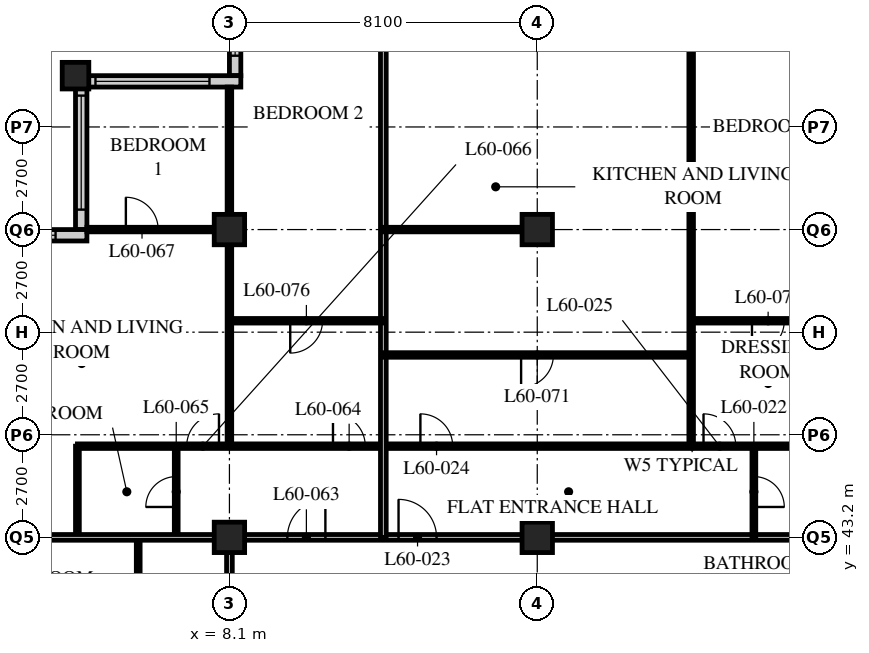
"""IFC4 building model, lengths in metres.
Left out: names, types, materials, properties, quantities, classifications, styles, units other than length and angle.
Written with IfcOpenShell. Run it as: python <this file> out.ifc"""

import sys

from ifc_helpers import new_model, si_unit, direction, frame, frame_2d, origin, origin_2d, place, context, subcontext, project, spatial, rectangle, hollow_rectangle, extrude, element, fill, save


model = new_model("IFC4")
c1 = context("Model", 3, precision=1e-05, world=origin(), true_north=direction((0.0, 1.0)))
c2 = subcontext(c1, "Body", "Model", "MODEL_VIEW")
j1 = project(units=[si_unit("LENGTHUNIT", "METRE"), si_unit("PLANEANGLEUNIT", "RADIAN")], contexts=[c1])
p1 = place(None, origin())
s1 = spatial("IfcSite", under=j1, at=p1, CompositionType="ELEMENT")
p2 = place(p1, origin())
s2 = spatial("IfcBuilding", under=s1, at=p2, CompositionType="ELEMENT")
p3 = place(p2, frame((0.0, 0.0, 231.6)))
s3 = spatial("IfcBuildingStorey", under=s2, at=p3, CompositionType="ELEMENT", Elevation=231.6)
p4 = place(p3, frame((4.05, 55.35, 0.0), z_axis=(0.0, 0.0, 1.0), x_axis=(1.0, 0.0, 0.0)))
e1 = element("IfcColumn", 1, at=p4, inside=s3, PredefinedType="COLUMN", context=c2, shape_type="SweptSolid", body=[
    extrude(hollow_rectangle(XDim=0.7, YDim=0.7, WallThickness=0.07, at=origin_2d()), origin(), (0.0, 0.0, 1.0), 3.6),
])
for number, where, z_axis, x_axis in (
    (2, (8.1, 43.2, 0.0), (0.0, 0.0, 1.0), (1.0, 0.0, 0.0)),
    (3, (8.1, 51.3, 0.0), (0.0, 0.0, 1.0), (1.0, 0.0, 0.0)),
    (4, (16.2, 43.2, 0.0), (0.0, 0.0, 1.0), (1.0, 0.0, 0.0)),
    (5, (16.2, 51.3, 0.0), (0.0, 0.0, 1.0), (1.0, 0.0, 0.0)),
):
    element("IfcColumn", number, at=place(p3, frame(where, z_axis=z_axis, x_axis=x_axis)), inside=s3, PredefinedType="COLUMN", context=c2, shape_type="SweptSolid", body=[
        extrude(hollow_rectangle(XDim=0.8, YDim=0.8, WallThickness=0.08, at=origin_2d()), origin(), (0.0, 0.0, 1.0), 3.6),
    ])
p5 = place(p3, frame((8.25, 59.1, 0.0), z_axis=(0.0, 0.0, 1.0), x_axis=(0.0, -1.0, 0.0)))
e6 = element("IfcWall", 6, at=p5, inside=s3, PredefinedType="SOLIDWALL", context=c2, shape_type="SweptSolid", body=[
    extrude(rectangle(XDim=3.75, YDim=0.3, at=frame_2d((1.875, 0.0))), origin(), (0.0, 0.0, 1.0), 2.35),
])
p6 = place(p5, frame((0.225, 0.0, 0.6)))
e7 = element("IfcOpeningElement", 7, at=p6, cuts=e6, PredefinedType="OPENING", context=c2, shape_type="SweptSolid", body=[
    extrude(rectangle(XDim=3.0, YDim=1.7, at=frame_2d((1.5, 0.85))), frame((0.0, 0.16, 0.0), z_axis=(0.0, -1.0, 0.0), x_axis=(1.0, 0.0, 0.0)), (0.0, 0.0, 1.0), 0.32),
])
p7 = place(p3, frame((8.4, 55.2, 0.0), z_axis=(0.0, 0.0, 1.0), x_axis=(-1.0, 0.0, 0.0)))
e8 = element("IfcWall", 8, at=p7, inside=s3, PredefinedType="SOLIDWALL", context=c2, shape_type="SweptSolid", body=[
    extrude(rectangle(XDim=4.35, YDim=0.3, at=frame_2d((2.175, 0.0))), origin(), (0.0, 0.0, 1.0), 2.65),
])
p8 = place(p7, frame((0.825, 0.0, 0.6)))
e9 = element("IfcOpeningElement", 9, at=p8, cuts=e8, PredefinedType="OPENING", context=c2, shape_type="SweptSolid", body=[
    extrude(rectangle(XDim=3.0, YDim=1.7, at=frame_2d((1.5, 0.85))), frame((0.0, 0.16, 0.0), z_axis=(0.0, -1.0, 0.0), x_axis=(1.0, 0.0, 0.0)), (0.0, 0.0, 1.0), 0.32),
])
p9 = place(p3, frame((4.2, 55.05, 0.0), z_axis=(0.0, 0.0, 1.0), x_axis=(0.0, -1.0, 0.0)))
e10 = element("IfcWall", 10, at=p9, inside=s3, PredefinedType="SOLIDWALL", context=c2, shape_type="SweptSolid", body=[
    extrude(rectangle(XDim=3.75, YDim=0.3, at=frame_2d((1.875, 0.0))), origin(), (0.0, 0.0, 1.0), 2.65),
])
p10 = place(p9, frame((0.225, 0.0, 0.6)))
e11 = element("IfcOpeningElement", 11, at=p10, cuts=e10, PredefinedType="OPENING", context=c2, shape_type="SweptSolid", body=[
    extrude(rectangle(XDim=3.0, YDim=1.7, at=frame_2d((1.5, 0.85))), frame((0.0, 0.16, 0.0), z_axis=(0.0, -1.0, 0.0), x_axis=(1.0, 0.0, 0.0)), (0.0, 0.0, 1.0), 0.32),
])
p11 = place(p3, frame((4.35, 51.15, 0.0), z_axis=(0.0, 0.0, 1.0), x_axis=(-1.0, 0.0, 0.0)))
e12 = element("IfcWall", 12, at=p11, inside=s3, PredefinedType="SOLIDWALL", context=c2, shape_type="SweptSolid", body=[
    extrude(rectangle(XDim=4.35, YDim=0.3, at=frame_2d((2.175, 0.0))), origin(), (0.0, 0.0, 1.0), 3.35),
])
p12 = place(p11, frame((0.825, 0.0, 0.6)))
e13 = element("IfcOpeningElement", 13, at=p12, cuts=e12, PredefinedType="OPENING", context=c2, shape_type="SweptSolid", body=[
    extrude(rectangle(XDim=3.0, YDim=1.7, at=frame_2d((1.5, 0.85))), frame((0.0, 0.16, 0.0), z_axis=(0.0, -1.0, 0.0), x_axis=(1.0, 0.0, 0.0)), (0.0, 0.0, 1.0), 0.32),
])
p13 = place(p3, frame((8.1, 43.2, 0.0), z_axis=(0.0, 0.0, 1.0), x_axis=(1.0, 0.0, 0.0)))
e14 = element("IfcWall", 14, at=p13, inside=s3, PredefinedType="PARTITIONING", context=c2, shape_type="SweptSolid", body=[
    extrude(rectangle(XDim=36.45, YDim=0.15, at=frame_2d((18.225, 0.0))), origin(), (0.0, 0.0, 1.0), 2.35),
])
p14 = place(p13, frame((4.45, 0.0, 0.0)))
e15 = element("IfcOpeningElement", 15, at=p14, cuts=e14, PredefinedType="OPENING", context=c2, shape_type="SweptSolid", body=[
    extrude(rectangle(XDim=1.0, YDim=2.1, at=frame_2d((0.5, 1.05))), frame((0.0, 0.085, 0.0), z_axis=(0.0, -1.0, 0.0), x_axis=(1.0, 0.0, 0.0)), (0.0, 0.0, 1.0), 0.17),
])
p15 = place(p13, frame((17.1, 0.0, 0.0)))
e16 = element("IfcOpeningElement", 16, at=p15, cuts=e14, PredefinedType="OPENING", context=c2, shape_type="SweptSolid", body=[
    extrude(rectangle(XDim=1.0, YDim=2.1, at=frame_2d((0.5, 1.05))), frame((0.0, 0.085, 0.0), z_axis=(0.0, -1.0, 0.0), x_axis=(1.0, 0.0, 0.0)), (0.0, 0.0, 1.0), 0.17),
])
p16 = place(p13, frame((29.05, 0.0, 0.0)))
e17 = element("IfcOpeningElement", 17, at=p16, cuts=e14, PredefinedType="OPENING", context=c2, shape_type="SweptSolid", body=[
    extrude(rectangle(XDim=1.0, YDim=2.1, at=frame_2d((0.5, 1.05))), frame((0.0, 0.085, 0.0), z_axis=(0.0, -1.0, 0.0), x_axis=(1.0, 0.0, 0.0)), (0.0, 0.0, 1.0), 0.17),
])
p17 = place(p13, frame((33.925, 0.0, 0.0)))
e18 = element("IfcOpeningElement", 18, at=p17, cuts=e14, PredefinedType="OPENING", context=c2, shape_type="SweptSolid", body=[
    extrude(rectangle(XDim=1.0, YDim=2.1, at=frame_2d((0.5, 1.05))), frame((0.0, 0.085, 0.0), z_axis=(0.0, -1.0, 0.0), x_axis=(1.0, 0.0, 0.0)), (0.0, 0.0, 1.0), 0.17),
])
p18 = place(p13, frame((1.525, 0.0, 0.0)))
e19 = element("IfcOpeningElement", 19, at=p18, cuts=e14, PredefinedType="OPENING", context=c2, shape_type="SweptSolid", body=[
    extrude(rectangle(XDim=1.0, YDim=2.1, at=frame_2d((0.5, 1.05))), frame((0.0, 0.085, 0.0), z_axis=(0.0, -1.0, 0.0), x_axis=(1.0, 0.0, 0.0)), (0.0, 0.0, 1.0), 0.17),
])
p19 = place(p3, frame((8.1, 18.9, 0.0), z_axis=(0.0, 0.0, 1.0), x_axis=(0.0, 1.0, 0.0)))
e20 = element("IfcWall", 20, at=p19, inside=s3, PredefinedType="PARTITIONING", context=c2, shape_type="SweptSolid", body=[
    extrude(rectangle(XDim=24.3, YDim=0.15, at=frame_2d((12.15, 0.0))), origin(), (0.0, 0.0, 1.0), 2.35),
])
p20 = place(p19, frame((0.9, 0.0, 0.0)))
e21 = element("IfcOpeningElement", 21, at=p20, cuts=e20, PredefinedType="OPENING", context=c2, shape_type="SweptSolid", body=[
    extrude(rectangle(XDim=1.0, YDim=2.1, at=frame_2d((0.5, 1.05))), frame((0.0, 0.085, 0.0), z_axis=(0.0, -1.0, 0.0), x_axis=(1.0, 0.0, 0.0)), (0.0, 0.0, 1.0), 0.17),
])
p21 = place(p19, frame((20.95, 0.0, 0.0)))
e22 = element("IfcOpeningElement", 22, at=p21, cuts=e20, PredefinedType="OPENING", context=c2, shape_type="SweptSolid", body=[
    extrude(rectangle(XDim=1.0, YDim=2.1, at=frame_2d((0.5, 1.05))), frame((0.0, 0.085, 0.0), z_axis=(0.0, -1.0, 0.0), x_axis=(1.0, 0.0, 0.0)), (0.0, 0.0, 1.0), 0.17),
])
p22 = place(p3, frame((21.9, 43.2, 0.0), z_axis=(0.0, 0.0, 1.0), x_axis=(0.0, 1.0, 0.0)))
e23 = element("IfcWall", 23, at=p22, inside=s3, PredefinedType="PARTITIONING", context=c2, shape_type="SweptSolid", body=[
    extrude(rectangle(XDim=2.4, YDim=0.1, at=frame_2d((1.2, 0.0))), origin(), (0.0, 0.0, 1.0), 3.35),
])
p23 = place(p22, frame((0.8, 0.0, 0.0)))
e24 = element("IfcOpeningElement", 24, at=p23, cuts=e23, PredefinedType="OPENING", context=c2, shape_type="SweptSolid", body=[
    extrude(rectangle(XDim=0.8, YDim=2.1, at=frame_2d((0.4, 1.05))), frame((0.0, 0.06, 0.0), z_axis=(0.0, -1.0, 0.0), x_axis=(1.0, 0.0, 0.0)), (0.0, 0.0, 1.0), 0.12),
])
p24 = place(p3, frame((20.25, 45.6, 0.0), z_axis=(0.0, 0.0, 1.0), x_axis=(0.0, 1.0, 0.0)))
e25 = element("IfcWall", 25, at=p24, inside=s3, PredefinedType="PARTITIONING", context=c2, shape_type="SweptSolid", body=[
    extrude(rectangle(XDim=13.5, YDim=0.12, at=frame_2d((6.75, 0.0))), origin(), (0.0, 0.0, 1.0), 3.35),
])
p25 = place(p3, frame((5.7, 41.0, 0.0), z_axis=(0.0, 0.0, 1.0), x_axis=(0.0, 1.0, 0.0)))
e26 = element("IfcWall", 26, at=p25, inside=s3, PredefinedType="PARTITIONING", context=c2, shape_type="SweptSolid", body=[
    extrude(rectangle(XDim=2.2, YDim=0.1, at=frame_2d((1.1, 0.0))), origin(), (0.0, 0.0, 1.0), 3.35),
])
p26 = place(p3, frame((6.7, 43.2, 0.0), z_axis=(0.0, 0.0, 1.0), x_axis=(0.0, 1.0, 0.0)))
e27 = element("IfcWall", 27, at=p26, inside=s3, PredefinedType="PARTITIONING", context=c2, shape_type="SweptSolid", body=[
    extrude(rectangle(XDim=2.4, YDim=0.1, at=frame_2d((1.2, 0.0))), origin(), (0.0, 0.0, 1.0), 3.35),
])
p27 = place(p26, frame((0.8, 0.0, 0.0)))
e28 = element("IfcOpeningElement", 28, at=p27, cuts=e27, PredefinedType="OPENING", context=c2, shape_type="SweptSolid", body=[
    extrude(rectangle(XDim=0.8, YDim=2.1, at=frame_2d((0.4, 1.05))), frame((0.0, 0.06, 0.0), z_axis=(0.0, -1.0, 0.0), x_axis=(1.0, 0.0, 0.0)), (0.0, 0.0, 1.0), 0.12),
])
p28 = place(p3, frame((4.1, 43.2, 0.0), z_axis=(0.0, 0.0, 1.0), x_axis=(0.0, 1.0, 0.0)))
e29 = element("IfcWall", 29, at=p28, inside=s3, PredefinedType="PARTITIONING", context=c2, shape_type="SweptSolid", body=[
    extrude(rectangle(XDim=2.4, YDim=0.1, at=frame_2d((1.2, 0.0))), origin(), (0.0, 0.0, 1.0), 3.35),
])
p29 = place(p3, frame((4.1, 45.6, 0.0), z_axis=(0.0, 0.0, 1.0), x_axis=(1.0, 0.0, 0.0)))
e30 = element("IfcWall", 30, at=p29, inside=s3, PredefinedType="PARTITIONING", context=c2, shape_type="SweptSolid", body=[
    extrude(rectangle(XDim=32.35, YDim=0.12, at=frame_2d((16.175, 0.0))), origin(), (0.0, 0.0, 1.0), 3.35),
])
p30 = place(p29, frame((9.025, 0.0, 0.0)))
e31 = element("IfcOpeningElement", 31, at=p30, cuts=e30, PredefinedType="OPENING", context=c2, shape_type="SweptSolid", body=[
    extrude(rectangle(XDim=0.85, YDim=2.1, at=frame_2d((0.425, 1.05))), frame((0.0, 0.07, 0.0), z_axis=(0.0, -1.0, 0.0), x_axis=(1.0, 0.0, 0.0)), (0.0, 0.0, 1.0), 0.14),
])
p31 = place(p29, frame((16.475, 0.0, 0.0)))
e32 = element("IfcOpeningElement", 32, at=p31, cuts=e30, PredefinedType="OPENING", context=c2, shape_type="SweptSolid", body=[
    extrude(rectangle(XDim=0.85, YDim=2.1, at=frame_2d((0.425, 1.05))), frame((0.0, 0.07, 0.0), z_axis=(0.0, -1.0, 0.0), x_axis=(1.0, 0.0, 0.0)), (0.0, 0.0, 1.0), 0.14),
])
p32 = place(p29, frame((21.175, 0.0, 0.0)))
e33 = element("IfcOpeningElement", 33, at=p32, cuts=e30, PredefinedType="OPENING", context=c2, shape_type="SweptSolid", body=[
    extrude(rectangle(XDim=0.85, YDim=2.1, at=frame_2d((0.425, 1.05))), frame((0.0, 0.07, 0.0), z_axis=(0.0, -1.0, 0.0), x_axis=(1.0, 0.0, 0.0)), (0.0, 0.0, 1.0), 0.14),
])
p33 = place(p29, frame((28.625, 0.0, 0.0)))
e34 = element("IfcOpeningElement", 34, at=p33, cuts=e30, PredefinedType="OPENING", context=c2, shape_type="SweptSolid", body=[
    extrude(rectangle(XDim=0.85, YDim=2.1, at=frame_2d((0.425, 1.05))), frame((0.0, 0.07, 0.0), z_axis=(0.0, -1.0, 0.0), x_axis=(1.0, 0.0, 0.0)), (0.0, 0.0, 1.0), 0.14),
])
p34 = place(p29, frame((6.725, 0.0, 0.0)))
e35 = element("IfcOpeningElement", 35, at=p34, cuts=e30, PredefinedType="OPENING", context=c2, shape_type="SweptSolid", body=[
    extrude(rectangle(XDim=0.85, YDim=2.1, at=frame_2d((0.425, 1.05))), frame((0.0, 0.07, 0.0), z_axis=(0.0, -1.0, 0.0), x_axis=(1.0, 0.0, 0.0)), (0.0, 0.0, 1.0), 0.14),
])
p35 = place(p29, frame((2.875, 0.0, 0.0)))
e36 = element("IfcOpeningElement", 36, at=p35, cuts=e30, PredefinedType="OPENING", context=c2, shape_type="SweptSolid", body=[
    extrude(rectangle(XDim=0.85, YDim=2.1, at=frame_2d((0.425, 1.05))), frame((0.0, 0.07, 0.0), z_axis=(0.0, -1.0, 0.0), x_axis=(1.0, 0.0, 0.0)), (0.0, 0.0, 1.0), 0.14),
])
p36 = place(p3, frame((8.1, 45.6, 0.0), z_axis=(0.0, 0.0, 1.0), x_axis=(0.0, 1.0, 0.0)))
e37 = element("IfcWall", 37, at=p36, inside=s3, PredefinedType="PARTITIONING", context=c2, shape_type="SweptSolid", body=[
    extrude(rectangle(XDim=9.45, YDim=0.12, at=frame_2d((4.725, 0.0))), origin(), (0.0, 0.0, 1.0), 2.35),
])
p37 = place(p3, frame((8.1, 51.3, 0.0), z_axis=(0.0, 0.0, 1.0), x_axis=(-1.0, 0.0, 0.0)))
e38 = element("IfcWall", 38, at=p37, inside=s3, PredefinedType="PARTITIONING", context=c2, shape_type="SweptSolid", body=[
    extrude(rectangle(XDim=3.75, YDim=0.12, at=frame_2d((1.875, 0.0))), origin(), (0.0, 0.0, 1.0), 2.588),
])
p38 = place(p37, frame((1.875, 0.0, 0.0)))
e39 = element("IfcOpeningElement", 39, at=p38, cuts=e38, PredefinedType="OPENING", context=c2, shape_type="SweptSolid", body=[
    extrude(rectangle(XDim=0.85, YDim=2.1, at=frame_2d((0.425, 1.05))), frame((0.0, 0.07, 0.0), z_axis=(0.0, -1.0, 0.0), x_axis=(1.0, 0.0, 0.0)), (0.0, 0.0, 1.0), 0.14),
])
p39 = place(p3, frame((0.3, 43.2, 0.0), z_axis=(0.0, 0.0, 1.0), x_axis=(1.0, 0.0, 0.0)))
e40 = element("IfcWall", 40, at=p39, inside=s3, PredefinedType="PARTITIONING", context=c2, shape_type="SweptSolid", body=[
    extrude(rectangle(XDim=7.8, YDim=0.15, at=frame_2d((3.9, 0.0))), origin(), (0.0, 0.0, 1.0), 2.35),
])
p40 = place(p3, frame((12.15, 43.2, 0.0), z_axis=(0.0, 0.0, 1.0), x_axis=(0.0, 1.0, 0.0)))
e41 = element("IfcWall", 41, at=p40, inside=s3, PredefinedType="PARTITIONING", context=c2, shape_type="SweptSolid", body=[
    extrude(rectangle(XDim=15.9, YDim=0.15, at=frame_2d((7.95, 0.0))), origin(), (0.0, 0.0, 1.0), 3.35),
])
p41 = place(p3, frame((12.15, 48.0, 0.0), z_axis=(0.0, 0.0, 1.0), x_axis=(1.0, 0.0, 0.0)))
e42 = element("IfcWall", 42, at=p41, inside=s3, PredefinedType="PARTITIONING", context=c2, shape_type="SweptSolid", body=[
    extrude(rectangle(XDim=8.1, YDim=0.12, at=frame_2d((4.05, 0.0))), origin(), (0.0, 0.0, 1.0), 3.35),
])
p42 = place(p41, frame((3.625, 0.0, 0.0)))
e43 = element("IfcOpeningElement", 43, at=p42, cuts=e42, PredefinedType="OPENING", context=c2, shape_type="SweptSolid", body=[
    extrude(rectangle(XDim=0.85, YDim=2.1, at=frame_2d((0.425, 1.05))), frame((0.0, 0.07, 0.0), z_axis=(0.0, -1.0, 0.0), x_axis=(1.0, 0.0, 0.0)), (0.0, 0.0, 1.0), 0.14),
])
p43 = place(p3, frame((20.25, 48.9, 0.0), z_axis=(0.0, 0.0, 1.0), x_axis=(1.0, 0.0, 0.0)))
e44 = element("IfcWall", 44, at=p43, inside=s3, PredefinedType="PARTITIONING", context=c2, shape_type="SweptSolid", body=[
    extrude(rectangle(XDim=4.05, YDim=0.12, at=frame_2d((2.025, 0.0))), origin(), (0.0, 0.0, 1.0), 3.35),
])
p44 = place(p43, frame((1.6, 0.0, 0.0)))
e45 = element("IfcOpeningElement", 45, at=p44, cuts=e44, PredefinedType="OPENING", context=c2, shape_type="SweptSolid", body=[
    extrude(rectangle(XDim=0.85, YDim=2.1, at=frame_2d((0.425, 1.05))), frame((0.0, 0.07, 0.0), z_axis=(0.0, -1.0, 0.0), x_axis=(1.0, 0.0, 0.0)), (0.0, 0.0, 1.0), 0.14),
])
p45 = place(p3, frame((8.1, 48.9, 0.0), z_axis=(0.0, 0.0, 1.0), x_axis=(1.0, 0.0, 0.0)))
e46 = element("IfcWall", 46, at=p45, inside=s3, PredefinedType="PARTITIONING", context=c2, shape_type="SweptSolid", body=[
    extrude(rectangle(XDim=4.05, YDim=0.12, at=frame_2d((2.025, 0.0))), origin(), (0.0, 0.0, 1.0), 3.35),
])
p46 = place(p45, frame((1.6, 0.0, 0.0)))
e47 = element("IfcOpeningElement", 47, at=p46, cuts=e46, PredefinedType="OPENING", context=c2, shape_type="SweptSolid", body=[
    extrude(rectangle(XDim=0.85, YDim=2.1, at=frame_2d((0.425, 1.05))), frame((0.0, 0.07, 0.0), z_axis=(0.0, -1.0, 0.0), x_axis=(1.0, 0.0, 0.0)), (0.0, 0.0, 1.0), 0.14),
])
p47 = place(p3, frame((12.15, 51.3, 0.0), z_axis=(0.0, 0.0, 1.0), x_axis=(1.0, 0.0, 0.0)))
e48 = element("IfcWall", 48, at=p47, inside=s3, PredefinedType="PARTITIONING", context=c2, shape_type="SweptSolid", body=[
    extrude(rectangle(XDim=3.65, YDim=0.12, at=frame_2d((1.825, 0.0))), origin(), (0.0, 0.0, 1.0), 2.588),
])
p48 = place(p6, origin())
e49 = element("IfcWindow", 49, at=p48, inside=s3, PartitioningType="SINGLE_PANEL", PredefinedType="WINDOW", context=c2, shape_type="SweptSolid", body=[
    extrude(rectangle(XDim=3.0, YDim=1.7, at=frame_2d((1.5, 0.85))), frame((0.0, 0.03, 0.0), z_axis=(0.0, -1.0, 0.0), x_axis=(1.0, 0.0, 0.0)), (0.0, 0.0, 1.0), 0.06),
])
fill(e7, e49)
p49 = place(p8, origin())
e50 = element("IfcWindow", 50, at=p49, inside=s3, PartitioningType="SINGLE_PANEL", PredefinedType="WINDOW", context=c2, shape_type="SweptSolid", body=[
    extrude(rectangle(XDim=3.0, YDim=1.7, at=frame_2d((1.5, 0.85))), frame((0.0, 0.03, 0.0), z_axis=(0.0, -1.0, 0.0), x_axis=(1.0, 0.0, 0.0)), (0.0, 0.0, 1.0), 0.06),
])
fill(e9, e50)
p50 = place(p10, origin())
e51 = element("IfcWindow", 51, at=p50, inside=s3, PartitioningType="SINGLE_PANEL", PredefinedType="WINDOW", context=c2, shape_type="SweptSolid", body=[
    extrude(rectangle(XDim=3.0, YDim=1.7, at=frame_2d((1.5, 0.85))), frame((0.0, 0.03, 0.0), z_axis=(0.0, -1.0, 0.0), x_axis=(1.0, 0.0, 0.0)), (0.0, 0.0, 1.0), 0.06),
])
fill(e11, e51)
p51 = place(p12, origin())
e52 = element("IfcWindow", 52, at=p51, inside=s3, PartitioningType="SINGLE_PANEL", PredefinedType="WINDOW", context=c2, shape_type="SweptSolid", body=[
    extrude(rectangle(XDim=3.0, YDim=1.7, at=frame_2d((1.5, 0.85))), frame((0.0, 0.03, 0.0), z_axis=(0.0, -1.0, 0.0), x_axis=(1.0, 0.0, 0.0)), (0.0, 0.0, 1.0), 0.06),
])
fill(e13, e52)
p52 = place(p23, origin())
e53 = element("IfcDoor", 53, at=p52, inside=s3, OperationType="SINGLE_SWING_RIGHT", PredefinedType="DOOR", context=c2, shape_type="SweptSolid", body=[
    extrude(rectangle(XDim=0.8, YDim=2.1, at=frame_2d((0.4, 1.05))), frame((0.0, 0.025, 0.0), z_axis=(0.0, -1.0, 0.0), x_axis=(1.0, 0.0, 0.0)), (0.0, 0.0, 1.0), 0.05),
])
fill(e24, e53)
p53 = place(p14, origin())
e54 = element("IfcDoor", 54, at=p53, inside=s3, OperationType="SINGLE_SWING_LEFT", PredefinedType="DOOR", context=c2, shape_type="SweptSolid", body=[
    extrude(rectangle(XDim=1.0, YDim=2.1, at=frame_2d((0.5, 1.05))), frame((0.0, 0.025, 0.0), z_axis=(0.0, -1.0, 0.0), x_axis=(1.0, 0.0, 0.0)), (0.0, 0.0, 1.0), 0.05),
])
fill(e15, e54)
p54 = place(p30, origin())
e55 = element("IfcDoor", 55, at=p54, inside=s3, OperationType="SINGLE_SWING_LEFT", PredefinedType="DOOR", context=c2, shape_type="SweptSolid", body=[
    extrude(rectangle(XDim=0.85, YDim=2.1, at=frame_2d((0.425, 1.05))), frame((0.0, 0.025, 0.0), z_axis=(0.0, -1.0, 0.0), x_axis=(1.0, 0.0, 0.0)), (0.0, 0.0, 1.0), 0.05),
])
fill(e31, e55)
p55 = place(p31, origin())
e56 = element("IfcDoor", 56, at=p55, inside=s3, OperationType="SINGLE_SWING_LEFT", PredefinedType="DOOR", context=c2, shape_type="SweptSolid", body=[
    extrude(rectangle(XDim=0.85, YDim=2.1, at=frame_2d((0.425, 1.05))), frame((0.0, 0.025, 0.0), z_axis=(0.0, -1.0, 0.0), x_axis=(1.0, 0.0, 0.0)), (0.0, 0.0, 1.0), 0.05),
])
fill(e32, e56)
p56 = place(p18, origin())
e57 = element("IfcDoor", 57, at=p56, inside=s3, OperationType="SINGLE_SWING_RIGHT", PredefinedType="DOOR", context=c2, shape_type="SweptSolid", body=[
    extrude(rectangle(XDim=1.0, YDim=2.1, at=frame_2d((0.5, 1.05))), frame((0.0, 0.025, 0.0), z_axis=(0.0, -1.0, 0.0), x_axis=(1.0, 0.0, 0.0)), (0.0, 0.0, 1.0), 0.05),
])
fill(e19, e57)
p57 = place(p34, origin())
e58 = element("IfcDoor", 58, at=p57, inside=s3, OperationType="SINGLE_SWING_LEFT", PredefinedType="DOOR", context=c2, shape_type="SweptSolid", body=[
    extrude(rectangle(XDim=0.85, YDim=2.1, at=frame_2d((0.425, 1.05))), frame((0.0, 0.025, 0.0), z_axis=(0.0, -1.0, 0.0), x_axis=(1.0, 0.0, 0.0)), (0.0, 0.0, 1.0), 0.05),
])
fill(e35, e58)
p58 = place(p27, origin())
e59 = element("IfcDoor", 59, at=p58, inside=s3, OperationType="SINGLE_SWING_LEFT", PredefinedType="DOOR", context=c2, shape_type="SweptSolid", body=[
    extrude(rectangle(XDim=0.8, YDim=2.1, at=frame_2d((0.4, 1.05))), frame((0.0, 0.025, 0.0), z_axis=(0.0, -1.0, 0.0), x_axis=(1.0, 0.0, 0.0)), (0.0, 0.0, 1.0), 0.05),
])
fill(e28, e59)
p59 = place(p35, origin())
e60 = element("IfcDoor", 60, at=p59, inside=s3, OperationType="SINGLE_SWING_RIGHT", PredefinedType="DOOR", context=c2, shape_type="SweptSolid", body=[
    extrude(rectangle(XDim=0.85, YDim=2.1, at=frame_2d((0.425, 1.05))), frame((0.0, 0.025, 0.0), z_axis=(0.0, -1.0, 0.0), x_axis=(1.0, 0.0, 0.0)), (0.0, 0.0, 1.0), 0.05),
])
fill(e36, e60)
p60 = place(p38, origin())
e61 = element("IfcDoor", 61, at=p60, inside=s3, OperationType="SINGLE_SWING_LEFT", PredefinedType="DOOR", context=c2, shape_type="SweptSolid", body=[
    extrude(rectangle(XDim=0.85, YDim=2.1, at=frame_2d((0.425, 1.05))), frame((0.0, 0.025, 0.0), z_axis=(0.0, -1.0, 0.0), x_axis=(1.0, 0.0, 0.0)), (0.0, 0.0, 1.0), 0.05),
])
fill(e39, e61)
p61 = place(p42, origin())
e62 = element("IfcDoor", 62, at=p61, inside=s3, OperationType="SINGLE_SWING_RIGHT", PredefinedType="DOOR", context=c2, shape_type="SweptSolid", body=[
    extrude(rectangle(XDim=0.85, YDim=2.1, at=frame_2d((0.425, 1.05))), frame((0.0, 0.025, 0.0), z_axis=(0.0, -1.0, 0.0), x_axis=(1.0, 0.0, 0.0)), (0.0, 0.0, 1.0), 0.05),
])
fill(e43, e62)
p62 = place(p44, origin())
e63 = element("IfcDoor", 63, at=p62, inside=s3, OperationType="SINGLE_SWING_RIGHT", PredefinedType="DOOR", context=c2, shape_type="SweptSolid", body=[
    extrude(rectangle(XDim=0.85, YDim=2.1, at=frame_2d((0.425, 1.05))), frame((0.0, 0.025, 0.0), z_axis=(0.0, -1.0, 0.0), x_axis=(1.0, 0.0, 0.0)), (0.0, 0.0, 1.0), 0.05),
])
fill(e45, e63)
p63 = place(p46, origin())
e64 = element("IfcDoor", 64, at=p63, inside=s3, OperationType="SINGLE_SWING_RIGHT", PredefinedType="DOOR", context=c2, shape_type="SweptSolid", body=[
    extrude(rectangle(XDim=0.85, YDim=2.1, at=frame_2d((0.425, 1.05))), frame((0.0, 0.025, 0.0), z_axis=(0.0, -1.0, 0.0), x_axis=(1.0, 0.0, 0.0)), (0.0, 0.0, 1.0), 0.05),
])
fill(e47, e64)
save(model, sys.argv[1])
